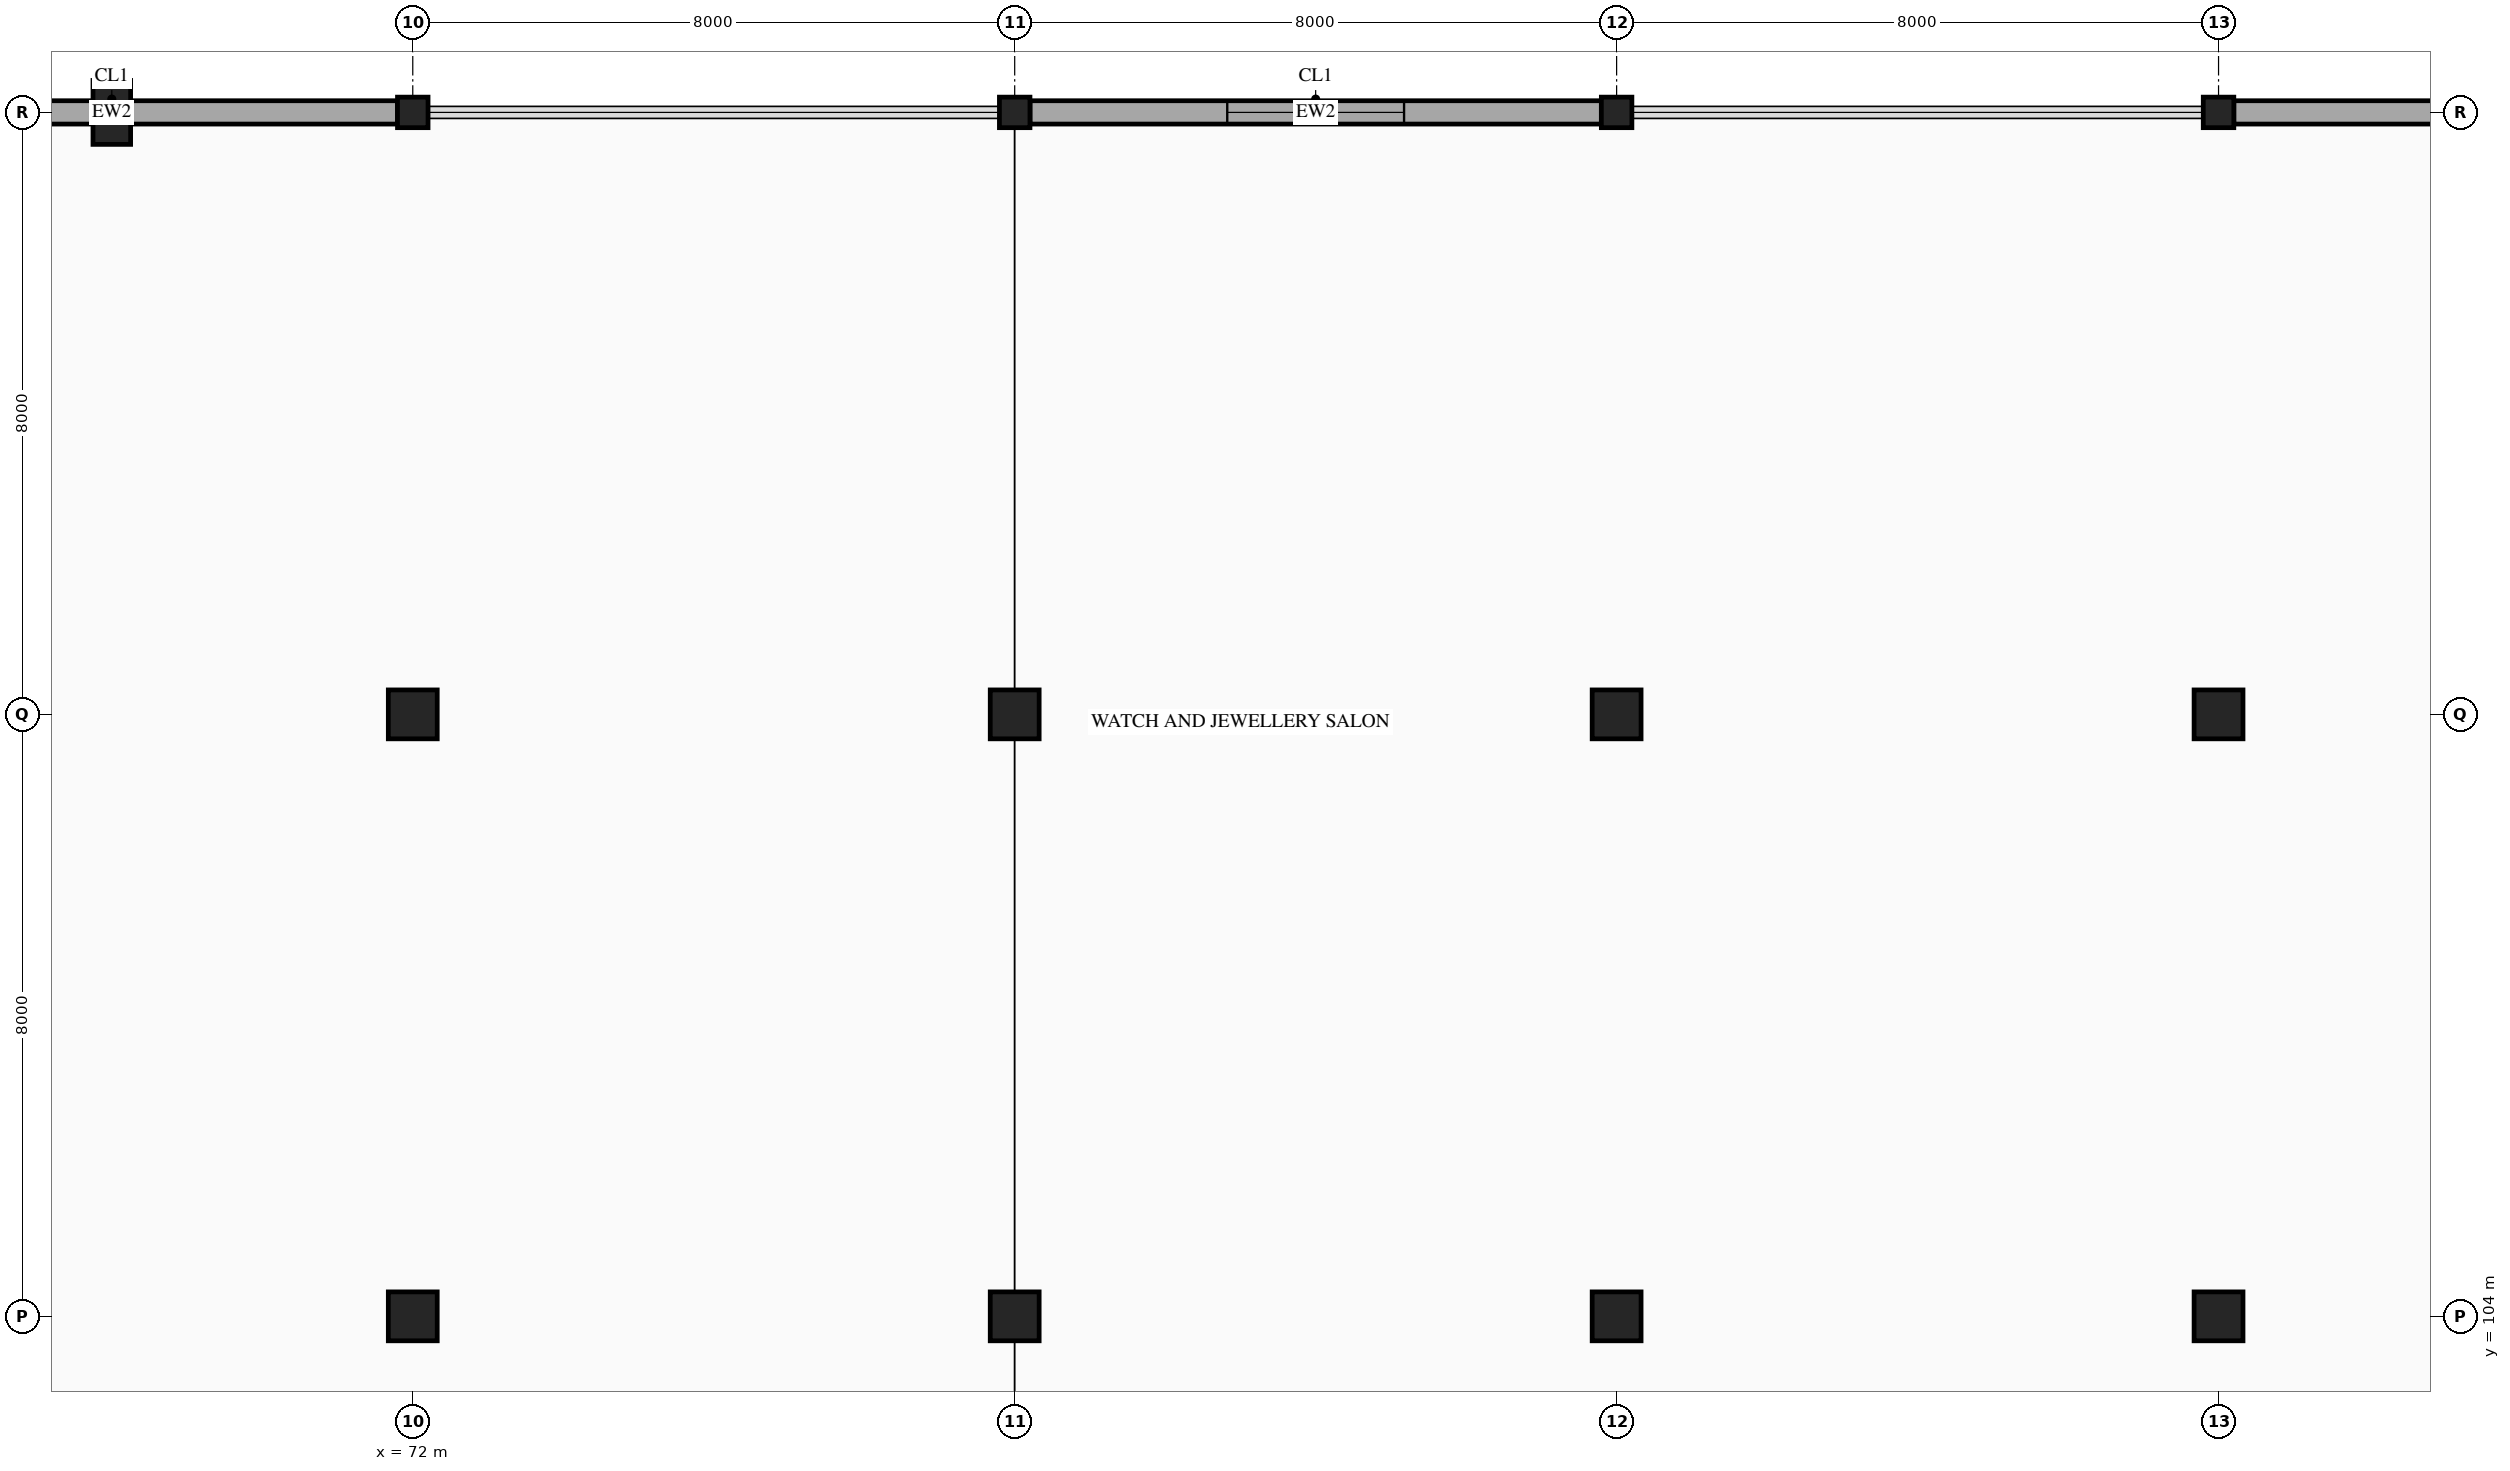
"""IFC4 building model, lengths in metres.
Left out: names, types, materials, properties, quantities, classifications, styles, units other than length and angle.
Written with IfcOpenShell. Run it as: python <this file> out.ifc"""

import sys

from ifc_helpers import new_model, si_unit, direction, frame, frame_2d, origin, origin_2d, place, context, subcontext, project, spatial, rectangle, hollow_rectangle, extrude, element, fill, save


model = new_model("IFC4")
c1 = context("Model", 3, precision=1e-05, world=origin(), true_north=direction((0.0, 1.0)))
c2 = subcontext(c1, "Body", "Model", "MODEL_VIEW")
j1 = project(units=[si_unit("LENGTHUNIT", "METRE"), si_unit("PLANEANGLEUNIT", "RADIAN")], contexts=[c1])
p1 = place(None, origin())
s1 = spatial("IfcSite", under=j1, at=p1, CompositionType="ELEMENT")
p2 = place(p1, origin())
s2 = spatial("IfcBuilding", under=s1, at=p2, CompositionType="ELEMENT")
p3 = place(p2, frame((0.0, 0.0, 10.4)))
s3 = spatial("IfcBuildingStorey", under=s2, at=p3, CompositionType="ELEMENT", Elevation=10.4)
for number, where, z_axis, x_axis in (
    (1, (72.0, 104.0, 0.0), (0.0, 0.0, 1.0), (1.0, 0.0, 0.0)),
    (2, (72.0, 112.0, 0.0), (0.0, 0.0, 1.0), (1.0, 0.0, 0.0)),
):
    element("IfcColumn", number, at=place(p3, frame(where, z_axis=z_axis, x_axis=x_axis)), inside=s3, PredefinedType="COLUMN", context=c2, shape_type="SweptSolid", body=[
        extrude(rectangle(XDim=0.65, YDim=0.65, at=origin_2d()), origin(), (0.0, 0.0, 1.0), 4.5),
    ])
p4 = place(p3, frame((72.0, 120.0, 0.0), z_axis=(0.0, 0.0, 1.0), x_axis=(1.0, 0.0, 0.0)))
e3 = element("IfcColumn", 3, at=p4, inside=s3, PredefinedType="COLUMN", context=c2, shape_type="SweptSolid", body=[
    extrude(hollow_rectangle(XDim=0.406, YDim=0.406, WallThickness=0.015, InnerFilletRadius=0.015, OuterFilletRadius=0.029, at=origin_2d()), origin(), (0.0, 0.0, 1.0), 4.5),
])
for number, where, z_axis, x_axis in (
    (4, (80.0, 104.0, 0.0), (0.0, 0.0, 1.0), (1.0, 0.0, 0.0)),
    (5, (80.0, 112.0, 0.0), (0.0, 0.0, 1.0), (1.0, 0.0, 0.0)),
):
    element("IfcColumn", number, at=place(p3, frame(where, z_axis=z_axis, x_axis=x_axis)), inside=s3, PredefinedType="COLUMN", context=c2, shape_type="SweptSolid", body=[
        extrude(rectangle(XDim=0.65, YDim=0.65, at=origin_2d()), origin(), (0.0, 0.0, 1.0), 4.5),
    ])
p5 = place(p3, frame((80.0, 120.0, 0.0), z_axis=(0.0, 0.0, 1.0), x_axis=(1.0, 0.0, 0.0)))
e6 = element("IfcColumn", 6, at=p5, inside=s3, PredefinedType="COLUMN", context=c2, shape_type="SweptSolid", body=[
    extrude(hollow_rectangle(XDim=0.406, YDim=0.406, WallThickness=0.015, InnerFilletRadius=0.015, OuterFilletRadius=0.029, at=origin_2d()), origin(), (0.0, 0.0, 1.0), 4.5),
])
for number, where, z_axis, x_axis in (
    (7, (88.0, 104.0, 0.0), (0.0, 0.0, 1.0), (1.0, 0.0, 0.0)),
    (8, (88.0, 112.0, 0.0), (0.0, 0.0, 1.0), (1.0, 0.0, 0.0)),
):
    element("IfcColumn", number, at=place(p3, frame(where, z_axis=z_axis, x_axis=x_axis)), inside=s3, PredefinedType="COLUMN", context=c2, shape_type="SweptSolid", body=[
        extrude(rectangle(XDim=0.65, YDim=0.65, at=origin_2d()), origin(), (0.0, 0.0, 1.0), 4.5),
    ])
p6 = place(p3, frame((88.0, 120.0, 0.0), z_axis=(0.0, 0.0, 1.0), x_axis=(1.0, 0.0, 0.0)))
e9 = element("IfcColumn", 9, at=p6, inside=s3, PredefinedType="COLUMN", context=c2, shape_type="SweptSolid", body=[
    extrude(hollow_rectangle(XDim=0.406, YDim=0.406, WallThickness=0.015, InnerFilletRadius=0.015, OuterFilletRadius=0.029, at=origin_2d()), origin(), (0.0, 0.0, 1.0), 4.5),
])
for number, where, z_axis, x_axis in (
    (10, (96.0, 104.0, 0.0), (0.0, 0.0, 1.0), (1.0, 0.0, 0.0)),
    (11, (96.0, 112.0, 0.0), (0.0, 0.0, 1.0), (1.0, 0.0, 0.0)),
):
    element("IfcColumn", number, at=place(p3, frame(where, z_axis=z_axis, x_axis=x_axis)), inside=s3, PredefinedType="COLUMN", context=c2, shape_type="SweptSolid", body=[
        extrude(rectangle(XDim=0.65, YDim=0.65, at=origin_2d()), origin(), (0.0, 0.0, 1.0), 4.5),
    ])
p7 = place(p3, frame((96.0, 120.0, 0.0), z_axis=(0.0, 0.0, 1.0), x_axis=(1.0, 0.0, 0.0)))
e12 = element("IfcColumn", 12, at=p7, inside=s3, PredefinedType="COLUMN", context=c2, shape_type="SweptSolid", body=[
    extrude(hollow_rectangle(XDim=0.406, YDim=0.406, WallThickness=0.015, InnerFilletRadius=0.015, OuterFilletRadius=0.029, at=origin_2d()), origin(), (0.0, 0.0, 1.0), 4.5),
])
p8 = place(p3, frame((68.0, 120.0, 0.0), z_axis=(0.0, 0.0, 1.0), x_axis=(1.0, 0.0, 0.0)))
e13 = element("IfcColumn", 13, at=p8, inside=s3, PredefinedType="PILASTER", context=c2, shape_type="SweptSolid", body=[
    extrude(rectangle(XDim=0.5, YDim=0.85, at=origin_2d()), origin(), (0.0, 0.0, 1.0), 4.5),
])
p9 = place(p3, frame((64.203, 120.0, 0.0), z_axis=(0.0, 0.0, 1.0), x_axis=(1.0, 0.0, 0.0)))
e14 = element("IfcWall", 14, at=p9, inside=s3, PredefinedType="STANDARD", context=c2, shape_type="SweptSolid", body=[
    extrude(rectangle(XDim=7.594, YDim=0.31, at=frame_2d((3.797, 0.0))), origin(), (0.0, 0.0, 1.0), 3.48),
])
p10 = place(p3, frame((80.203, 120.0, 0.0), z_axis=(0.0, 0.0, 1.0), x_axis=(1.0, 0.0, 0.0)))
e15 = element("IfcWall", 15, at=p10, inside=s3, PredefinedType="STANDARD", context=c2, shape_type="SweptSolid", body=[
    extrude(rectangle(XDim=7.594, YDim=0.31, at=frame_2d((3.797, 0.0))), origin(), (0.0, 0.0, 1.0), 3.48),
])
p11 = place(p10, frame((2.622, 0.0, 0.8)))
e16 = element("IfcOpeningElement", 16, at=p11, cuts=e15, PredefinedType="OPENING", context=c2, shape_type="SweptSolid", body=[
    extrude(rectangle(XDim=2.35, YDim=2.15, at=frame_2d((1.175, 1.075))), frame((0.0, 0.165, 0.0), z_axis=(0.0, -1.0, 0.0), x_axis=(1.0, 0.0, 0.0)), (0.0, 0.0, 1.0), 0.33),
])
p12 = place(p3, frame((96.203, 120.0, 0.0), z_axis=(0.0, 0.0, 1.0), x_axis=(1.0, 0.0, 0.0)))
e17 = element("IfcWall", 17, at=p12, inside=s3, PredefinedType="STANDARD", context=c2, shape_type="SweptSolid", body=[
    extrude(rectangle(XDim=7.594, YDim=0.31, at=frame_2d((3.797, 0.0))), origin(), (0.0, 0.0, 1.0), 3.48),
])
p13 = place(p11, origin())
e18 = element("IfcWindow", 18, at=p13, inside=s3, PartitioningType="DOUBLE_PANEL_VERTICAL", PredefinedType="WINDOW", context=c2, shape_type="SweptSolid", body=[
    extrude(rectangle(XDim=2.35, YDim=2.15, at=frame_2d((1.175, 1.075))), frame((0.0, 0.03, 0.0), z_axis=(0.0, -1.0, 0.0), x_axis=(1.0, 0.0, 0.0)), (0.0, 0.0, 1.0), 0.06),
])
fill(e16, e18)
save(model, sys.argv[1])
